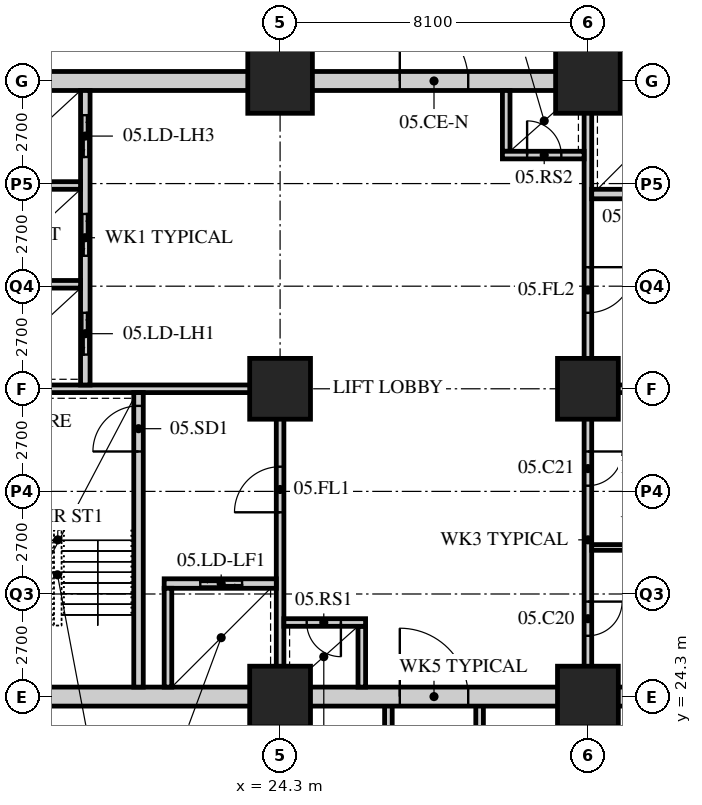
"""IFC4 building model, lengths in metres.
Left out: names, types, materials, properties, quantities, classifications, styles, units other than length and angle.
Written with IfcOpenShell. Run it as: python <this file> out.ifc"""

import sys

from ifc_helpers import new_model, si_unit, direction, frame, frame_2d, origin, origin_2d, place, context, subcontext, project, spatial, rectangle, hollow_rectangle, extrude, element, fill, save


model = new_model("IFC4")
c1 = context("Model", 3, precision=1e-05, world=origin(), true_north=direction((0.0, 1.0)))
c2 = subcontext(c1, "Body", "Model", "MODEL_VIEW")
j1 = project(units=[si_unit("LENGTHUNIT", "METRE"), si_unit("PLANEANGLEUNIT", "RADIAN")], contexts=[c1])
p1 = place(None, origin())
s1 = spatial("IfcSite", under=j1, at=p1, CompositionType="ELEMENT")
p2 = place(p1, origin())
s2 = spatial("IfcBuilding", under=s1, at=p2, CompositionType="ELEMENT")
p3 = place(p2, frame((0.0, 0.0, 27.6)))
s3 = spatial("IfcBuildingStorey", under=s2, at=p3, CompositionType="ELEMENT", Elevation=27.6)
for number, where, z_axis, x_axis in (
    (1, (24.3, 24.3, 0.0), (0.0, 0.0, 1.0), (1.0, 0.0, 0.0)),
    (2, (24.3, 32.4, 0.0), (0.0, 0.0, 1.0), (1.0, 0.0, 0.0)),
):
    element("IfcColumn", number, at=place(p3, frame(where, z_axis=z_axis, x_axis=x_axis)), inside=s3, PredefinedType="COLUMN", context=c2, shape_type="SweptSolid", body=[
        extrude(hollow_rectangle(XDim=1.6, YDim=1.6, WallThickness=0.15, at=origin_2d()), origin(), (0.0, 0.0, 1.0), 5.4),
    ])
p4 = place(p3, frame((24.3, 40.5, 0.0), z_axis=(0.0, 0.0, 1.0), x_axis=(1.0, 0.0, 0.0)))
e3 = element("IfcColumn", 3, at=p4, inside=s3, PredefinedType="COLUMN", context=c2, shape_type="SweptSolid", body=[
    extrude(hollow_rectangle(XDim=1.7, YDim=1.7, WallThickness=0.16, at=origin_2d()), origin(), (0.0, 0.0, 1.0), 5.4),
])
for number, where, z_axis, x_axis in (
    (4, (32.4, 24.3, 0.0), (0.0, 0.0, 1.0), (1.0, 0.0, 0.0)),
    (5, (32.4, 32.4, 0.0), (0.0, 0.0, 1.0), (1.0, 0.0, 0.0)),
):
    element("IfcColumn", number, at=place(p3, frame(where, z_axis=z_axis, x_axis=x_axis)), inside=s3, PredefinedType="COLUMN", context=c2, shape_type="SweptSolid", body=[
        extrude(hollow_rectangle(XDim=1.6, YDim=1.6, WallThickness=0.15, at=origin_2d()), origin(), (0.0, 0.0, 1.0), 5.4),
    ])
p5 = place(p3, frame((32.4, 40.5, 0.0), z_axis=(0.0, 0.0, 1.0), x_axis=(1.0, 0.0, 0.0)))
e6 = element("IfcColumn", 6, at=p5, inside=s3, PredefinedType="COLUMN", context=c2, shape_type="SweptSolid", body=[
    extrude(hollow_rectangle(XDim=1.7, YDim=1.7, WallThickness=0.16, at=origin_2d()), origin(), (0.0, 0.0, 1.0), 5.4),
])
for number, where, z_axis, x_axis in (
    (7, (27.15, 9.9, 0.0), (0.0, 0.0, 1.0), (0.0, 1.0, 0.0)),
    (8, (29.55, 9.9, 0.0), (0.0, 0.0, 1.0), (0.0, 1.0, 0.0)),
):
    element("IfcWall", number, at=place(p3, frame(where, z_axis=z_axis, x_axis=x_axis)), inside=s3, PredefinedType="SOLIDWALL", context=c2, shape_type="SweptSolid", body=[
        extrude(rectangle(XDim=14.4, YDim=0.2, at=frame_2d((7.2, 0.0))), origin(), (0.0, 0.0, 1.0), 5.19),
    ])
p6 = place(p3, frame((15.95, 24.3, 0.0), z_axis=(0.0, 0.0, 1.0), x_axis=(1.0, 0.0, 0.0)))
e9 = element("IfcWall", 9, at=p6, inside=s3, PredefinedType="SOLIDWALL", context=c2, shape_type="SweptSolid", body=[
    extrude(rectangle(XDim=24.8, YDim=0.5, at=frame_2d((12.4, 0.0))), origin(), (0.0, 0.0, 1.0), 4.54),
])
p7 = place(p6, frame((11.5, 0.0, 0.0)))
e10 = element("IfcOpeningElement", 10, at=p7, cuts=e9, PredefinedType="OPENING", context=c2, shape_type="SweptSolid", body=[
    extrude(rectangle(XDim=1.8, YDim=2.4, at=frame_2d((0.9, 1.2))), frame((0.0, 0.26, 0.0), z_axis=(0.0, -1.0, 0.0), x_axis=(1.0, 0.0, 0.0)), (0.0, 0.0, 1.0), 0.52),
])
p8 = place(p3, frame((15.95, 40.5, 0.0), z_axis=(0.0, 0.0, 1.0), x_axis=(1.0, 0.0, 0.0)))
e11 = element("IfcWall", 11, at=p8, inside=s3, PredefinedType="SOLIDWALL", context=c2, shape_type="SweptSolid", body=[
    extrude(rectangle(XDim=24.8, YDim=0.5, at=frame_2d((12.4, 0.0))), origin(), (0.0, 0.0, 1.0), 4.54),
])
p9 = place(p8, frame((11.5, 0.0, 0.0)))
e12 = element("IfcOpeningElement", 12, at=p9, cuts=e11, PredefinedType="OPENING", context=c2, shape_type="SweptSolid", body=[
    extrude(rectangle(XDim=1.8, YDim=2.4, at=frame_2d((0.9, 1.2))), frame((0.0, 0.26, 0.0), z_axis=(0.0, -1.0, 0.0), x_axis=(1.0, 0.0, 0.0)), (0.0, 0.0, 1.0), 0.52),
])
p10 = place(p3, frame((16.45, 32.4, 0.0), z_axis=(0.0, 0.0, 1.0), x_axis=(1.0, 0.0, 0.0)))
e13 = element("IfcWall", 13, at=p10, inside=s3, PredefinedType="SOLIDWALL", context=c2, shape_type="SweptSolid", body=[
    extrude(rectangle(XDim=7.95, YDim=0.2, at=frame_2d((3.975, 0.0))), origin(), (0.0, 0.0, 1.0), 4.578),
])
p11 = place(p3, frame((24.3, 24.55, 0.0), z_axis=(0.0, 0.0, 1.0), x_axis=(0.0, 1.0, 0.0)))
e14 = element("IfcWall", 14, at=p11, inside=s3, PredefinedType="SOLIDWALL", context=c2, shape_type="SweptSolid", body=[
    extrude(rectangle(XDim=7.75, YDim=0.2, at=frame_2d((3.875, 0.0))), origin(), (0.0, 0.0, 1.0), 4.578),
])
p12 = place(p11, frame((4.6, 0.0, 0.0)))
e15 = element("IfcOpeningElement", 15, at=p12, cuts=e14, PredefinedType="OPENING", context=c2, shape_type="SweptSolid", body=[
    extrude(rectangle(XDim=1.2, YDim=2.1, at=frame_2d((0.6, 1.05))), frame((0.0, 0.11, 0.0), z_axis=(0.0, -1.0, 0.0), x_axis=(1.0, 0.0, 0.0)), (0.0, 0.0, 1.0), 0.22),
])
p13 = place(p3, frame((20.575, 24.55, 0.0), z_axis=(0.0, 0.0, 1.0), x_axis=(0.0, 1.0, 0.0)))
e16 = element("IfcWall", 16, at=p13, inside=s3, PredefinedType="SOLIDWALL", context=c2, shape_type="SweptSolid", body=[
    extrude(rectangle(XDim=7.75, YDim=0.25, at=frame_2d((3.875, 0.0))), origin(), (0.0, 0.0, 1.0), 5.19),
])
p14 = place(p13, frame((6.2, 0.0, 0.0)))
e17 = element("IfcOpeningElement", 17, at=p14, cuts=e16, PredefinedType="OPENING", context=c2, shape_type="SweptSolid", body=[
    extrude(rectangle(XDim=1.2, YDim=2.1, at=frame_2d((0.6, 1.05))), frame((0.0, 0.135, 0.0), z_axis=(0.0, -1.0, 0.0), x_axis=(1.0, 0.0, 0.0)), (0.0, 0.0, 1.0), 0.27),
])
p15 = place(p3, frame((21.25, 27.275, 0.0), z_axis=(0.0, 0.0, 1.0), x_axis=(1.0, 0.0, 0.0)))
e18 = element("IfcWall", 18, at=p15, inside=s3, PredefinedType="SOLIDWALL", context=c2, shape_type="SweptSolid", body=[
    extrude(rectangle(XDim=2.95, YDim=0.25, at=frame_2d((1.475, 0.0))), origin(), (0.0, 0.0, 1.0), 5.19),
])
p16 = place(p15, frame((0.95, 0.0, 0.0)))
e19 = element("IfcOpeningElement", 19, at=p16, cuts=e18, PredefinedType="OPENING", context=c2, shape_type="SweptSolid", body=[
    extrude(rectangle(XDim=1.1, YDim=2.4, at=frame_2d((0.55, 1.2))), frame((0.0, 0.135, 0.0), z_axis=(0.0, -1.0, 0.0), x_axis=(1.0, 0.0, 0.0)), (0.0, 0.0, 1.0), 0.27),
])
p17 = place(p3, frame((21.35, 24.55, 0.0), z_axis=(0.0, 0.0, 1.0), x_axis=(0.0, 1.0, 0.0)))
e20 = element("IfcWall", 20, at=p17, inside=s3, PredefinedType="SOLIDWALL", context=c2, shape_type="SweptSolid", body=[
    extrude(rectangle(XDim=2.6, YDim=0.2, at=frame_2d((1.3, 0.0))), origin(), (0.0, 0.0, 1.0), 5.19),
])
p18 = place(p3, frame((19.175, 32.5, 0.0), z_axis=(0.0, 0.0, 1.0), x_axis=(0.0, 1.0, 0.0)))
e21 = element("IfcWall", 21, at=p18, inside=s3, PredefinedType="SOLIDWALL", context=c2, shape_type="SweptSolid", body=[
    extrude(rectangle(XDim=7.75, YDim=0.25, at=frame_2d((3.875, 0.0))), origin(), (0.0, 0.0, 1.0), 5.19),
])
p19 = place(p18, frame((0.8, 0.0, 0.0)))
e22 = element("IfcOpeningElement", 22, at=p19, cuts=e21, PredefinedType="OPENING", context=c2, shape_type="SweptSolid", body=[
    extrude(rectangle(XDim=1.1, YDim=2.4, at=frame_2d((0.55, 1.2))), frame((0.0, 0.135, 0.0), z_axis=(0.0, -1.0, 0.0), x_axis=(1.0, 0.0, 0.0)), (0.0, 0.0, 1.0), 0.27),
])
p20 = place(p18, frame((3.4, 0.0, 0.0)))
e23 = element("IfcOpeningElement", 23, at=p20, cuts=e21, PredefinedType="OPENING", context=c2, shape_type="SweptSolid", body=[
    extrude(rectangle(XDim=1.1, YDim=2.4, at=frame_2d((0.55, 1.2))), frame((0.0, 0.135, 0.0), z_axis=(0.0, -1.0, 0.0), x_axis=(1.0, 0.0, 0.0)), (0.0, 0.0, 1.0), 0.27),
])
p21 = place(p18, frame((6.0, 0.0, 0.0)))
e24 = element("IfcOpeningElement", 24, at=p21, cuts=e21, PredefinedType="OPENING", context=c2, shape_type="SweptSolid", body=[
    extrude(rectangle(XDim=1.1, YDim=2.4, at=frame_2d((0.55, 1.2))), frame((0.0, 0.135, 0.0), z_axis=(0.0, -1.0, 0.0), x_axis=(1.0, 0.0, 0.0)), (0.0, 0.0, 1.0), 0.27),
])
for number, where, z_axis, x_axis in (
    (25, (16.45, 35.15, 0.0), (0.0, 0.0, 1.0), (1.0, 0.0, 0.0)),
    (26, (16.45, 37.75, 0.0), (0.0, 0.0, 1.0), (1.0, 0.0, 0.0)),
):
    element("IfcWall", number, at=place(p3, frame(where, z_axis=z_axis, x_axis=x_axis)), inside=s3, PredefinedType="SOLIDWALL", context=c2, shape_type="SweptSolid", body=[
        extrude(rectangle(XDim=2.6, YDim=0.2, at=frame_2d((1.3, 0.0))), origin(), (0.0, 0.0, 1.0), 5.19),
    ])
p22 = place(p3, frame((26.45, 24.55, 0.0), z_axis=(0.0, 0.0, 1.0), x_axis=(0.0, 1.0, 0.0)))
e27 = element("IfcWall", 27, at=p22, inside=s3, PredefinedType="SOLIDWALL", context=c2, shape_type="SweptSolid", body=[
    extrude(rectangle(XDim=1.6, YDim=0.2, at=frame_2d((0.8, 0.0))), origin(), (0.0, 0.0, 1.0), 5.19),
])
p23 = place(p3, frame((24.4, 26.25, 0.0), z_axis=(0.0, 0.0, 1.0), x_axis=(1.0, 0.0, 0.0)))
e28 = element("IfcWall", 28, at=p23, inside=s3, PredefinedType="SOLIDWALL", context=c2, shape_type="SweptSolid", body=[
    extrude(rectangle(XDim=2.15, YDim=0.2, at=frame_2d((1.075, 0.0))), origin(), (0.0, 0.0, 1.0), 5.19),
])
p24 = place(p23, frame((0.6, 0.0, 0.0)))
e29 = element("IfcOpeningElement", 29, at=p24, cuts=e28, PredefinedType="OPENING", context=c2, shape_type="SweptSolid", body=[
    extrude(rectangle(XDim=0.9, YDim=2.1, at=frame_2d((0.45, 1.05))), frame((0.0, 0.11, 0.0), z_axis=(0.0, -1.0, 0.0), x_axis=(1.0, 0.0, 0.0)), (0.0, 0.0, 1.0), 0.22),
])
p25 = place(p3, frame((32.3, 32.4, 0.0), z_axis=(0.0, 0.0, 1.0), x_axis=(1.0, 0.0, 0.0)))
e30 = element("IfcWall", 30, at=p25, inside=s3, PredefinedType="SOLIDWALL", context=c2, shape_type="SweptSolid", body=[
    extrude(rectangle(XDim=7.95, YDim=0.2, at=frame_2d((3.975, 0.0))), origin(), (0.0, 0.0, 1.0), 4.578),
])
p26 = place(p3, frame((32.4, 32.5, 0.0), z_axis=(0.0, 0.0, 1.0), x_axis=(0.0, 1.0, 0.0)))
e31 = element("IfcWall", 31, at=p26, inside=s3, PredefinedType="SOLIDWALL", context=c2, shape_type="SweptSolid", body=[
    extrude(rectangle(XDim=7.75, YDim=0.2, at=frame_2d((3.875, 0.0))), origin(), (0.0, 0.0, 1.0), 4.578),
])
p27 = place(p26, frame((1.9, 0.0, 0.0)))
e32 = element("IfcOpeningElement", 32, at=p27, cuts=e31, PredefinedType="OPENING", context=c2, shape_type="SweptSolid", body=[
    extrude(rectangle(XDim=1.2, YDim=2.1, at=frame_2d((0.6, 1.05))), frame((0.0, 0.11, 0.0), z_axis=(0.0, -1.0, 0.0), x_axis=(1.0, 0.0, 0.0)), (0.0, 0.0, 1.0), 0.22),
])
p28 = place(p3, frame((32.5, 37.525, 0.0), z_axis=(0.0, 0.0, 1.0), x_axis=(1.0, 0.0, 0.0)))
e33 = element("IfcWall", 33, at=p28, inside=s3, PredefinedType="SOLIDWALL", context=c2, shape_type="SweptSolid", body=[
    extrude(rectangle(XDim=2.95, YDim=0.25, at=frame_2d((1.475, 0.0))), origin(), (0.0, 0.0, 1.0), 5.19),
])
p29 = place(p28, frame((0.9, 0.0, 0.0)))
e34 = element("IfcOpeningElement", 34, at=p29, cuts=e33, PredefinedType="OPENING", context=c2, shape_type="SweptSolid", body=[
    extrude(rectangle(XDim=1.1, YDim=2.4, at=frame_2d((0.55, 1.2))), frame((0.0, 0.135, 0.0), z_axis=(0.0, -1.0, 0.0), x_axis=(1.0, 0.0, 0.0)), (0.0, 0.0, 1.0), 0.27),
])
p30 = place(p3, frame((30.25, 38.65, 0.0), z_axis=(0.0, 0.0, 1.0), x_axis=(0.0, 1.0, 0.0)))
e35 = element("IfcWall", 35, at=p30, inside=s3, PredefinedType="SOLIDWALL", context=c2, shape_type="SweptSolid", body=[
    extrude(rectangle(XDim=1.6, YDim=0.2, at=frame_2d((0.8, 0.0))), origin(), (0.0, 0.0, 1.0), 5.19),
])
p31 = place(p3, frame((30.15, 38.55, 0.0), z_axis=(0.0, 0.0, 1.0), x_axis=(1.0, 0.0, 0.0)))
e36 = element("IfcWall", 36, at=p31, inside=s3, PredefinedType="SOLIDWALL", context=c2, shape_type="SweptSolid", body=[
    extrude(rectangle(XDim=2.15, YDim=0.2, at=frame_2d((1.075, 0.0))), origin(), (0.0, 0.0, 1.0), 5.19),
])
p32 = place(p31, frame((0.65, 0.0, 0.0)))
e37 = element("IfcOpeningElement", 37, at=p32, cuts=e36, PredefinedType="OPENING", context=c2, shape_type="SweptSolid", body=[
    extrude(rectangle(XDim=0.9, YDim=2.1, at=frame_2d((0.45, 1.05))), frame((0.0, 0.11, 0.0), z_axis=(0.0, -1.0, 0.0), x_axis=(1.0, 0.0, 0.0)), (0.0, 0.0, 1.0), 0.22),
])
p33 = place(p3, frame((32.4, 24.55, 0.0), z_axis=(0.0, 0.0, 1.0), x_axis=(0.0, 1.0, 0.0)))
e38 = element("IfcWall", 38, at=p33, inside=s3, PredefinedType="PARTITIONING", context=c2, shape_type="SweptSolid", body=[
    extrude(rectangle(XDim=7.75, YDim=0.2, at=frame_2d((3.875, 0.0))), origin(), (0.0, 0.0, 1.0), 4.578),
])
p34 = place(p33, frame((1.35, 0.0, 0.0)))
e39 = element("IfcOpeningElement", 39, at=p34, cuts=e38, PredefinedType="OPENING", context=c2, shape_type="SweptSolid", body=[
    extrude(rectangle(XDim=0.9, YDim=2.1, at=frame_2d((0.45, 1.05))), frame((0.0, 0.11, 0.0), z_axis=(0.0, -1.0, 0.0), x_axis=(1.0, 0.0, 0.0)), (0.0, 0.0, 1.0), 0.22),
])
p35 = place(p33, frame((5.3, 0.0, 0.0)))
e40 = element("IfcOpeningElement", 40, at=p35, cuts=e38, PredefinedType="OPENING", context=c2, shape_type="SweptSolid", body=[
    extrude(rectangle(XDim=0.9, YDim=2.1, at=frame_2d((0.45, 1.05))), frame((0.0, 0.11, 0.0), z_axis=(0.0, -1.0, 0.0), x_axis=(1.0, 0.0, 0.0)), (0.0, 0.0, 1.0), 0.22),
])
p36 = place(p3, frame((32.5, 28.225, 0.0), z_axis=(0.0, 0.0, 1.0), x_axis=(1.0, 0.0, 0.0)))
e41 = element("IfcWall", 41, at=p36, inside=s3, PredefinedType="PARTITIONING", context=c2, shape_type="SweptSolid", body=[
    extrude(rectangle(XDim=4.9, YDim=0.15, at=frame_2d((2.45, 0.0))), origin(), (0.0, 0.0, 1.0), 5.19),
])
p37 = place(p34, origin())
e42 = element("IfcDoor", 42, at=p37, inside=s3, OperationType="SINGLE_SWING_LEFT", PredefinedType="DOOR", context=c2, shape_type="SweptSolid", body=[
    extrude(rectangle(XDim=0.9, YDim=2.1, at=frame_2d((0.45, 1.05))), frame((0.0, 0.025, 0.0), z_axis=(0.0, -1.0, 0.0), x_axis=(1.0, 0.0, 0.0)), (0.0, 0.0, 1.0), 0.05),
])
fill(e39, e42)
p38 = place(p35, origin())
e43 = element("IfcDoor", 43, at=p38, inside=s3, OperationType="SINGLE_SWING_LEFT", PredefinedType="DOOR", context=c2, shape_type="SweptSolid", body=[
    extrude(rectangle(XDim=0.9, YDim=2.1, at=frame_2d((0.45, 1.05))), frame((0.0, 0.025, 0.0), z_axis=(0.0, -1.0, 0.0), x_axis=(1.0, 0.0, 0.0)), (0.0, 0.0, 1.0), 0.05),
])
fill(e40, e43)
p39 = place(p14, origin())
e44 = element("IfcDoor", 44, at=p39, inside=s3, OperationType="SINGLE_SWING_LEFT", PredefinedType="DOOR", context=c2, shape_type="SweptSolid", body=[
    extrude(rectangle(XDim=1.2, YDim=2.1, at=frame_2d((0.6, 1.05))), frame((0.0, 0.025, 0.0), z_axis=(0.0, -1.0, 0.0), x_axis=(1.0, 0.0, 0.0)), (0.0, 0.0, 1.0), 0.05),
])
fill(e17, e44)
p40 = place(p12, origin())
e45 = element("IfcDoor", 45, at=p40, inside=s3, OperationType="SINGLE_SWING_LEFT", PredefinedType="DOOR", context=c2, shape_type="SweptSolid", body=[
    extrude(rectangle(XDim=1.2, YDim=2.1, at=frame_2d((0.6, 1.05))), frame((0.0, 0.025, 0.0), z_axis=(0.0, -1.0, 0.0), x_axis=(1.0, 0.0, 0.0)), (0.0, 0.0, 1.0), 0.05),
])
fill(e15, e45)
p41 = place(p24, origin())
e46 = element("IfcDoor", 46, at=p41, inside=s3, OperationType="SINGLE_SWING_LEFT", PredefinedType="DOOR", context=c2, shape_type="SweptSolid", body=[
    extrude(rectangle(XDim=0.9, YDim=2.1, at=frame_2d((0.45, 1.05))), frame((0.0, 0.025, 0.0), z_axis=(0.0, -1.0, 0.0), x_axis=(1.0, 0.0, 0.0)), (0.0, 0.0, 1.0), 0.05),
])
fill(e29, e46)
p42 = place(p27, origin())
e47 = element("IfcDoor", 47, at=p42, inside=s3, OperationType="SINGLE_SWING_LEFT", PredefinedType="DOOR", context=c2, shape_type="SweptSolid", body=[
    extrude(rectangle(XDim=1.2, YDim=2.1, at=frame_2d((0.6, 1.05))), frame((0.0, 0.025, 0.0), z_axis=(0.0, -1.0, 0.0), x_axis=(1.0, 0.0, 0.0)), (0.0, 0.0, 1.0), 0.05),
])
fill(e32, e47)
p43 = place(p32, origin())
e48 = element("IfcDoor", 48, at=p43, inside=s3, OperationType="SINGLE_SWING_LEFT", PredefinedType="DOOR", context=c2, shape_type="SweptSolid", body=[
    extrude(rectangle(XDim=0.9, YDim=2.1, at=frame_2d((0.45, 1.05))), frame((0.0, 0.025, 0.0), z_axis=(0.0, -1.0, 0.0), x_axis=(1.0, 0.0, 0.0)), (0.0, 0.0, 1.0), 0.05),
])
fill(e37, e48)
p44 = place(p19, origin())
e49 = element("IfcDoor", 49, at=p44, inside=s3, OperationType="DOUBLE_DOOR_SLIDING", PredefinedType="DOOR", context=c2, shape_type="SweptSolid", body=[
    extrude(rectangle(XDim=1.1, YDim=2.4, at=frame_2d((0.55, 1.2))), frame((0.0, 0.025, 0.0), z_axis=(0.0, -1.0, 0.0), x_axis=(1.0, 0.0, 0.0)), (0.0, 0.0, 1.0), 0.05),
])
fill(e22, e49)
p45 = place(p20, origin())
e50 = element("IfcDoor", 50, at=p45, inside=s3, OperationType="DOUBLE_DOOR_SLIDING", PredefinedType="DOOR", context=c2, shape_type="SweptSolid", body=[
    extrude(rectangle(XDim=1.1, YDim=2.4, at=frame_2d((0.55, 1.2))), frame((0.0, 0.025, 0.0), z_axis=(0.0, -1.0, 0.0), x_axis=(1.0, 0.0, 0.0)), (0.0, 0.0, 1.0), 0.05),
])
fill(e23, e50)
p46 = place(p21, origin())
e51 = element("IfcDoor", 51, at=p46, inside=s3, OperationType="DOUBLE_DOOR_SLIDING", PredefinedType="DOOR", context=c2, shape_type="SweptSolid", body=[
    extrude(rectangle(XDim=1.1, YDim=2.4, at=frame_2d((0.55, 1.2))), frame((0.0, 0.025, 0.0), z_axis=(0.0, -1.0, 0.0), x_axis=(1.0, 0.0, 0.0)), (0.0, 0.0, 1.0), 0.05),
])
fill(e24, e51)
p47 = place(p16, origin())
e52 = element("IfcDoor", 52, at=p47, inside=s3, OperationType="DOUBLE_DOOR_SLIDING", PredefinedType="DOOR", context=c2, shape_type="SweptSolid", body=[
    extrude(rectangle(XDim=1.1, YDim=2.4, at=frame_2d((0.55, 1.2))), frame((0.0, 0.025, 0.0), z_axis=(0.0, -1.0, 0.0), x_axis=(1.0, 0.0, 0.0)), (0.0, 0.0, 1.0), 0.05),
])
fill(e19, e52)
p48 = place(p7, origin())
e53 = element("IfcDoor", 53, at=p48, inside=s3, OperationType="DOUBLE_DOOR_SINGLE_SWING", PredefinedType="DOOR", context=c2, shape_type="SweptSolid", body=[
    extrude(rectangle(XDim=1.8, YDim=2.4, at=frame_2d((0.9, 1.2))), frame((0.0, 0.025, 0.0), z_axis=(0.0, -1.0, 0.0), x_axis=(1.0, 0.0, 0.0)), (0.0, 0.0, 1.0), 0.05),
])
fill(e10, e53)
p49 = place(p9, origin())
e54 = element("IfcDoor", 54, at=p49, inside=s3, OperationType="DOUBLE_DOOR_SINGLE_SWING", PredefinedType="DOOR", context=c2, shape_type="SweptSolid", body=[
    extrude(rectangle(XDim=1.8, YDim=2.4, at=frame_2d((0.9, 1.2))), frame((0.0, 0.025, 0.0), z_axis=(0.0, -1.0, 0.0), x_axis=(1.0, 0.0, 0.0)), (0.0, 0.0, 1.0), 0.05),
])
fill(e12, e54)
save(model, sys.argv[1])
